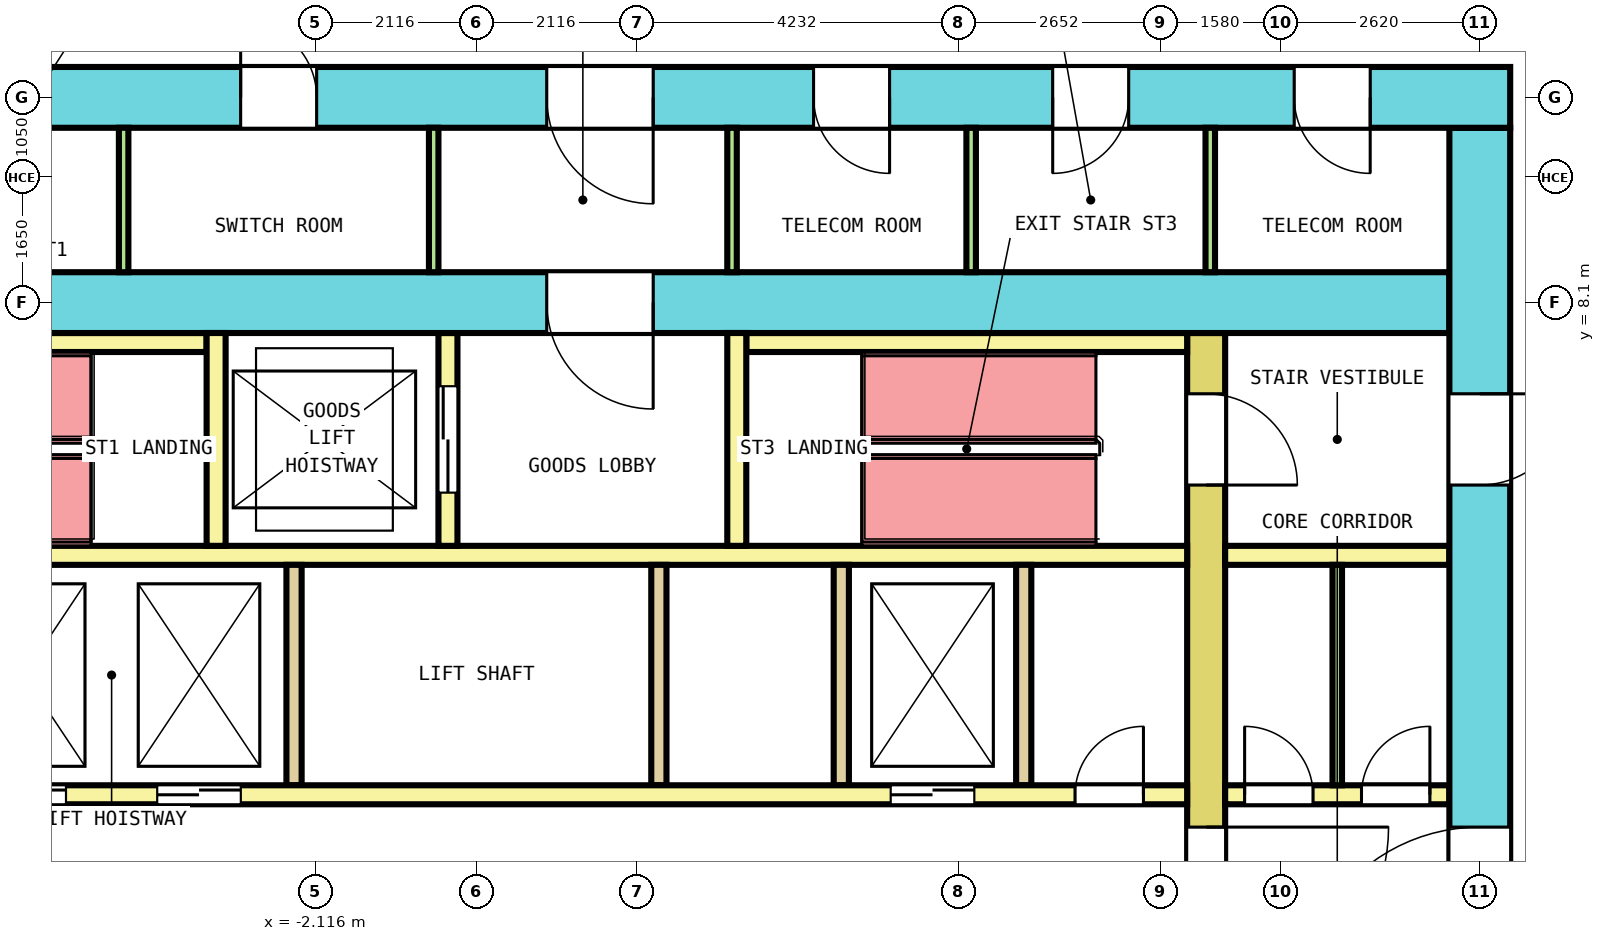
"""IFC4 building model, lengths in metres.
Left out: names, types, materials, properties, quantities, classifications, styles, units other than length and angle.
Written with IfcOpenShell. Run it as: python <this file> out.ifc"""

import sys

from ifc_helpers import new_model, si_unit, direction, frame, frame_2d, origin, place, context, subcontext, project, spatial, rectangle, extrude, element, fill, save


model = new_model("IFC4")
c1 = context("Model", 3, precision=1e-05, world=origin(), true_north=direction((0.0, 1.0)))
c2 = subcontext(c1, "Body", "Model", "MODEL_VIEW")
j1 = project(units=[si_unit("LENGTHUNIT", "METRE"), si_unit("PLANEANGLEUNIT", "RADIAN")], contexts=[c1])
p1 = place(None, origin())
s1 = spatial("IfcSite", under=j1, at=p1, CompositionType="ELEMENT")
p2 = place(p1, origin())
s2 = spatial("IfcBuilding", under=s1, at=p2, CompositionType="ELEMENT")
p3 = place(p2, frame((0.0, 0.0, 113.2)))
s3 = spatial("IfcBuildingStorey", under=s2, at=p3, CompositionType="ELEMENT", Elevation=113.2)
p4 = place(p3, frame((-13.6, 10.8, 0.0), z_axis=(0.0, 0.0, 1.0), x_axis=(1.0, 0.0, 0.0)))
e1 = element("IfcWall", 1, at=p4, inside=s3, PredefinedType="SHEAR", context=c2, shape_type="SweptSolid", body=[
    extrude(rectangle(XDim=27.2, YDim=0.8, at=frame_2d((13.6, 0.0))), origin(), (0.0, 0.0, 1.0), 4.1),
])
p5 = place(p4, frame((2.308, 0.0, 0.0)))
e2 = element("IfcOpeningElement", 2, at=p5, cuts=e1, PredefinedType="OPENING", context=c2, shape_type="SweptSolid", body=[
    extrude(rectangle(XDim=1.0, YDim=2.1, at=frame_2d((0.5, 1.05))), frame((0.0, 0.41, 0.0), z_axis=(0.0, -1.0, 0.0), x_axis=(1.0, 0.0, 0.0)), (0.0, 0.0, 1.0), 0.82),
])
p6 = place(p4, frame((6.419, 0.0, 0.0)))
e3 = element("IfcOpeningElement", 3, at=p6, cuts=e1, PredefinedType="OPENING", context=c2, shape_type="SweptSolid", body=[
    extrude(rectangle(XDim=1.0, YDim=2.1, at=frame_2d((0.5, 1.05))), frame((0.0, 0.41, 0.0), z_axis=(0.0, -1.0, 0.0), x_axis=(1.0, 0.0, 0.0)), (0.0, 0.0, 1.0), 0.82),
])
p7 = place(p4, frame((10.498, 0.0, 0.0)))
e4 = element("IfcOpeningElement", 4, at=p7, cuts=e1, PredefinedType="OPENING", context=c2, shape_type="SweptSolid", body=[
    extrude(rectangle(XDim=1.0, YDim=2.1, at=frame_2d((0.5, 1.05))), frame((0.0, 0.41, 0.0), z_axis=(0.0, -1.0, 0.0), x_axis=(1.0, 0.0, 0.0)), (0.0, 0.0, 1.0), 0.82),
])
p8 = place(p4, frame((18.035, 0.0, 0.0)))
e5 = element("IfcOpeningElement", 5, at=p8, cuts=e1, PredefinedType="OPENING", context=c2, shape_type="SweptSolid", body=[
    extrude(rectangle(XDim=1.0, YDim=2.1, at=frame_2d((0.5, 1.05))), frame((0.0, 0.41, 0.0), z_axis=(0.0, -1.0, 0.0), x_axis=(1.0, 0.0, 0.0)), (0.0, 0.0, 1.0), 0.82),
])
p9 = place(p4, frame((21.181, 0.0, 0.0)))
e6 = element("IfcOpeningElement", 6, at=p9, cuts=e1, PredefinedType="OPENING", context=c2, shape_type="SweptSolid", body=[
    extrude(rectangle(XDim=1.0, YDim=2.1, at=frame_2d((0.5, 1.05))), frame((0.0, 0.41, 0.0), z_axis=(0.0, -1.0, 0.0), x_axis=(1.0, 0.0, 0.0)), (0.0, 0.0, 1.0), 0.82),
])
p10 = place(p4, frame((24.358, 0.0, 0.0)))
e7 = element("IfcOpeningElement", 7, at=p10, cuts=e1, PredefinedType="OPENING", context=c2, shape_type="SweptSolid", body=[
    extrude(rectangle(XDim=1.0, YDim=2.1, at=frame_2d((0.5, 1.05))), frame((0.0, 0.41, 0.0), z_axis=(0.0, -1.0, 0.0), x_axis=(1.0, 0.0, 0.0)), (0.0, 0.0, 1.0), 0.82),
])
p11 = place(p4, frame((14.525, 0.0, 0.0)))
e8 = element("IfcOpeningElement", 8, at=p11, cuts=e1, PredefinedType="OPENING", context=c2, shape_type="SweptSolid", body=[
    extrude(rectangle(XDim=1.4, YDim=2.1, at=frame_2d((0.7, 1.05))), frame((0.0, 0.41, 0.0), z_axis=(0.0, -1.0, 0.0), x_axis=(1.0, 0.0, 0.0)), (0.0, 0.0, 1.0), 0.82),
])
p12 = place(p3, frame((13.2, -10.4, 0.0), z_axis=(0.0, 0.0, 1.0), x_axis=(0.0, 1.0, 0.0)))
e9 = element("IfcWall", 9, at=p12, inside=s3, PredefinedType="SHEAR", context=c2, shape_type="SweptSolid", body=[
    extrude(rectangle(XDim=20.8, YDim=0.8, at=frame_2d((10.4, 0.0))), origin(), (0.0, 0.0, 1.0), 4.1),
])
p13 = place(p12, frame((9.2, 0.0, 0.0)))
e10 = element("IfcOpeningElement", 10, at=p13, cuts=e9, PredefinedType="OPENING", context=c2, shape_type="SweptSolid", body=[
    extrude(rectangle(XDim=2.4, YDim=2.1, at=frame_2d((1.2, 1.05))), frame((0.0, 0.41, 0.0), z_axis=(0.0, -1.0, 0.0), x_axis=(1.0, 0.0, 0.0)), (0.0, 0.0, 1.0), 0.82),
])
p14 = place(p12, frame((16.1, 0.0, 0.0)))
e11 = element("IfcOpeningElement", 11, at=p14, cuts=e9, PredefinedType="OPENING", context=c2, shape_type="SweptSolid", body=[
    extrude(rectangle(XDim=1.2, YDim=2.1, at=frame_2d((0.6, 1.05))), frame((0.0, 0.41, 0.0), z_axis=(0.0, -1.0, 0.0), x_axis=(1.0, 0.0, 0.0)), (0.0, 0.0, 1.0), 0.82),
])
p15 = place(p12, frame((3.6, 0.0, 0.0)))
e12 = element("IfcOpeningElement", 12, at=p15, cuts=e9, PredefinedType="OPENING", context=c2, shape_type="SweptSolid", body=[
    extrude(rectangle(XDim=1.0, YDim=2.1, at=frame_2d((0.5, 1.05))), frame((0.0, 0.41, 0.0), z_axis=(0.0, -1.0, 0.0), x_axis=(1.0, 0.0, 0.0)), (0.0, 0.0, 1.0), 0.82),
])
p16 = place(p3, frame((-12.8, 8.1, 0.0), z_axis=(0.0, 0.0, 1.0), x_axis=(1.0, 0.0, 0.0)))
e13 = element("IfcWall", 13, at=p16, inside=s3, PredefinedType="SHEAR", context=c2, shape_type="SweptSolid", body=[
    extrude(rectangle(XDim=25.6, YDim=0.8, at=frame_2d((12.8, 0.0))), origin(), (0.0, 0.0, 1.0), 4.1),
])
p17 = place(p16, frame((13.725, 0.0, 0.0)))
e14 = element("IfcOpeningElement", 14, at=p17, cuts=e13, PredefinedType="OPENING", context=c2, shape_type="SweptSolid", body=[
    extrude(rectangle(XDim=1.4, YDim=2.1, at=frame_2d((0.7, 1.05))), frame((0.0, 0.41, 0.0), z_axis=(0.0, -1.0, 0.0), x_axis=(1.0, 0.0, 0.0)), (0.0, 0.0, 1.0), 0.82),
])
p18 = place(p3, frame((9.6, -7.7, 0.0), z_axis=(0.0, 0.0, 1.0), x_axis=(0.0, 1.0, 0.0)))
e15 = element("IfcWall", 15, at=p18, inside=s3, PredefinedType="SHEAR", context=c2, shape_type="SweptSolid", body=[
    extrude(rectangle(XDim=15.4, YDim=0.5, at=frame_2d((7.7, 0.0))), origin(), (0.0, 0.0, 1.0), 4.1),
])
p19 = place(p18, frame((6.5, 0.0, 0.0)))
e16 = element("IfcOpeningElement", 16, at=p19, cuts=e15, PredefinedType="OPENING", context=c2, shape_type="SweptSolid", body=[
    extrude(rectangle(XDim=2.4, YDim=2.1, at=frame_2d((1.2, 1.05))), frame((0.0, 0.26, 0.0), z_axis=(0.0, -1.0, 0.0), x_axis=(1.0, 0.0, 0.0)), (0.0, 0.0, 1.0), 0.52),
])
p20 = place(p18, frame((13.4, 0.0, 0.0)))
e17 = element("IfcOpeningElement", 17, at=p20, cuts=e15, PredefinedType="OPENING", context=c2, shape_type="SweptSolid", body=[
    extrude(rectangle(XDim=1.2, YDim=2.1, at=frame_2d((0.6, 1.05))), frame((0.0, 0.26, 0.0), z_axis=(0.0, -1.0, 0.0), x_axis=(1.0, 0.0, 0.0)), (0.0, 0.0, 1.0), 0.52),
])
p21 = place(p18, frame((0.9, 0.0, 0.0)))
e18 = element("IfcOpeningElement", 18, at=p21, cuts=e15, PredefinedType="OPENING", context=c2, shape_type="SweptSolid", body=[
    extrude(rectangle(XDim=1.0, YDim=2.1, at=frame_2d((0.5, 1.05))), frame((0.0, 0.26, 0.0), z_axis=(0.0, -1.0, 0.0), x_axis=(1.0, 0.0, 0.0)), (0.0, 0.0, 1.0), 0.52),
])
p22 = place(p3, frame((-9.35, 1.625, 0.0), z_axis=(0.0, 0.0, 1.0), x_axis=(1.0, 0.0, 0.0)))
e19 = element("IfcWall", 19, at=p22, inside=s3, PredefinedType="SOLIDWALL", context=c2, shape_type="SweptSolid", body=[
    extrude(rectangle(XDim=18.7, YDim=0.25, at=frame_2d((9.35, 0.0))), origin(), (0.0, 0.0, 1.0), 4.1),
])
p23 = place(p22, frame((2.85, 0.0, 0.0)))
e20 = element("IfcOpeningElement", 20, at=p23, cuts=e19, PredefinedType="OPENING", context=c2, shape_type="SweptSolid", body=[
    extrude(rectangle(XDim=1.1, YDim=2.1, at=frame_2d((0.55, 1.05))), frame((0.0, 0.135, 0.0), z_axis=(0.0, -1.0, 0.0), x_axis=(1.0, 0.0, 0.0)), (0.0, 0.0, 1.0), 0.27),
])
p24 = place(p22, frame((5.15, 0.0, 0.0)))
e21 = element("IfcOpeningElement", 21, at=p24, cuts=e19, PredefinedType="OPENING", context=c2, shape_type="SweptSolid", body=[
    extrude(rectangle(XDim=1.1, YDim=2.1, at=frame_2d((0.55, 1.05))), frame((0.0, 0.135, 0.0), z_axis=(0.0, -1.0, 0.0), x_axis=(1.0, 0.0, 0.0)), (0.0, 0.0, 1.0), 0.27),
])
p25 = place(p22, frame((14.8, 0.0, 0.0)))
e22 = element("IfcOpeningElement", 22, at=p25, cuts=e19, PredefinedType="OPENING", context=c2, shape_type="SweptSolid", body=[
    extrude(rectangle(XDim=1.1, YDim=2.1, at=frame_2d((0.55, 1.05))), frame((0.0, 0.135, 0.0), z_axis=(0.0, -1.0, 0.0), x_axis=(1.0, 0.0, 0.0)), (0.0, 0.0, 1.0), 0.27),
])
p26 = place(p22, frame((0.575, 0.0, 0.0)))
e23 = element("IfcOpeningElement", 23, at=p26, cuts=e19, PredefinedType="OPENING", context=c2, shape_type="SweptSolid", body=[
    extrude(rectangle(XDim=0.9, YDim=2.1, at=frame_2d((0.45, 1.05))), frame((0.0, 0.135, 0.0), z_axis=(0.0, -1.0, 0.0), x_axis=(1.0, 0.0, 0.0)), (0.0, 0.0, 1.0), 0.27),
])
p27 = place(p22, frame((17.225, 0.0, 0.0)))
e24 = element("IfcOpeningElement", 24, at=p27, cuts=e19, PredefinedType="OPENING", context=c2, shape_type="SweptSolid", body=[
    extrude(rectangle(XDim=0.9, YDim=2.1, at=frame_2d((0.45, 1.05))), frame((0.0, 0.135, 0.0), z_axis=(0.0, -1.0, 0.0), x_axis=(1.0, 0.0, 0.0)), (0.0, 0.0, 1.0), 0.27),
])
p28 = place(p3, frame((9.85, 1.625, 0.0), z_axis=(0.0, 0.0, 1.0), x_axis=(1.0, 0.0, 0.0)))
e25 = element("IfcWall", 25, at=p28, inside=s3, PredefinedType="SOLIDWALL", context=c2, shape_type="SweptSolid", body=[
    extrude(rectangle(XDim=2.95, YDim=0.25, at=frame_2d((1.475, 0.0))), origin(), (0.0, 0.0, 1.0), 4.1),
])
p29 = place(p28, frame((0.256, 0.0, 0.0)))
e26 = element("IfcOpeningElement", 26, at=p29, cuts=e25, PredefinedType="OPENING", context=c2, shape_type="SweptSolid", body=[
    extrude(rectangle(XDim=0.9, YDim=2.1, at=frame_2d((0.45, 1.05))), frame((0.0, 0.135, 0.0), z_axis=(0.0, -1.0, 0.0), x_axis=(1.0, 0.0, 0.0)), (0.0, 0.0, 1.0), 0.27),
])
p30 = place(p28, frame((1.794, 0.0, 0.0)))
e27 = element("IfcOpeningElement", 27, at=p30, cuts=e25, PredefinedType="OPENING", context=c2, shape_type="SweptSolid", body=[
    extrude(rectangle(XDim=0.9, YDim=2.1, at=frame_2d((0.45, 1.05))), frame((0.0, 0.135, 0.0), z_axis=(0.0, -1.0, 0.0), x_axis=(1.0, 0.0, 0.0)), (0.0, 0.0, 1.0), 0.27),
])
p31 = place(p3, frame((-9.35, 4.775, 0.0), z_axis=(0.0, 0.0, 1.0), x_axis=(1.0, 0.0, 0.0)))
e28 = element("IfcWall", 28, at=p31, inside=s3, PredefinedType="SOLIDWALL", context=c2, shape_type="SweptSolid", body=[
    extrude(rectangle(XDim=18.7, YDim=0.25, at=frame_2d((9.35, 0.0))), origin(), (0.0, 0.0, 1.0), 4.1),
])
p32 = place(p3, frame((9.85, 4.775, 0.0), z_axis=(0.0, 0.0, 1.0), x_axis=(1.0, 0.0, 0.0)))
e29 = element("IfcWall", 29, at=p32, inside=s3, PredefinedType="SOLIDWALL", context=c2, shape_type="SweptSolid", body=[
    extrude(rectangle(XDim=2.95, YDim=0.25, at=frame_2d((1.475, 0.0))), origin(), (0.0, 0.0, 1.0), 4.1),
])
for number, where, z_axis, x_axis in (
    (30, (-2.4, 1.75, 0.0), (0.0, 0.0, 1.0), (0.0, 1.0, 0.0)),
    (31, (2.4, 1.75, 0.0), (0.0, 0.0, 1.0), (0.0, 1.0, 0.0)),
    (32, (4.8, 1.75, 0.0), (0.0, 0.0, 1.0), (0.0, 1.0, 0.0)),
    (33, (7.2, 1.75, 0.0), (0.0, 0.0, 1.0), (0.0, 1.0, 0.0)),
):
    element("IfcWall", number, at=place(p3, frame(where, z_axis=z_axis, x_axis=x_axis)), inside=s3, PredefinedType="SOLIDWALL", context=c2, shape_type="SweptSolid", body=[
        extrude(rectangle(XDim=2.9, YDim=0.2, at=frame_2d((1.45, 0.0))), origin(), (0.0, 0.0, 1.0), 4.1),
    ])
for number, where, z_axis, x_axis in (
    (34, (-9.35, 7.575, 0.0), (0.0, 0.0, 1.0), (1.0, 0.0, 0.0)),
    (35, (3.55, 7.575, 0.0), (0.0, 0.0, 1.0), (1.0, 0.0, 0.0)),
):
    element("IfcWall", number, at=place(p3, frame(where, z_axis=z_axis, x_axis=x_axis)), inside=s3, PredefinedType="SOLIDWALL", context=c2, shape_type="SweptSolid", body=[
        extrude(rectangle(XDim=5.8, YDim=0.25, at=frame_2d((2.9, 0.0))), origin(), (0.0, 0.0, 1.0), 4.1),
    ])
p33 = place(p3, frame((-3.425, 4.9, 0.0), z_axis=(0.0, 0.0, 1.0), x_axis=(0.0, 1.0, 0.0)))
e36 = element("IfcWall", 36, at=p33, inside=s3, PredefinedType="SOLIDWALL", context=c2, shape_type="SweptSolid", body=[
    extrude(rectangle(XDim=2.8, YDim=0.25, at=frame_2d((1.4, 0.0))), origin(), (0.0, 0.0, 1.0), 4.1),
])
p34 = place(p3, frame((-0.375, 4.9, 0.0), z_axis=(0.0, 0.0, 1.0), x_axis=(0.0, 1.0, 0.0)))
e37 = element("IfcWall", 37, at=p34, inside=s3, PredefinedType="SOLIDWALL", context=c2, shape_type="SweptSolid", body=[
    extrude(rectangle(XDim=2.8, YDim=0.25, at=frame_2d((1.4, 0.0))), origin(), (0.0, 0.0, 1.0), 4.1),
])
p35 = place(p34, frame((0.7, 0.0, 0.0)))
e38 = element("IfcOpeningElement", 38, at=p35, cuts=e37, PredefinedType="OPENING", context=c2, shape_type="SweptSolid", body=[
    extrude(rectangle(XDim=1.4, YDim=2.1, at=frame_2d((0.7, 1.05))), frame((0.0, 0.135, 0.0), z_axis=(0.0, -1.0, 0.0), x_axis=(1.0, 0.0, 0.0)), (0.0, 0.0, 1.0), 0.27),
])
p36 = place(p3, frame((3.425, 4.9, 0.0), z_axis=(0.0, 0.0, 1.0), x_axis=(0.0, 1.0, 0.0)))
e39 = element("IfcWall", 39, at=p36, inside=s3, PredefinedType="SOLIDWALL", context=c2, shape_type="SweptSolid", body=[
    extrude(rectangle(XDim=2.8, YDim=0.25, at=frame_2d((1.4, 0.0))), origin(), (0.0, 0.0, 1.0), 4.1),
])
for number, where, z_axis, x_axis in (
    (40, (-4.642, 8.5, 0.0), (0.0, 0.0, 1.0), (0.0, 1.0, 0.0)),
    (41, (-0.562, 8.5, 0.0), (0.0, 0.0, 1.0), (0.0, 1.0, 0.0)),
    (42, (3.363, 8.5, 0.0), (0.0, 0.0, 1.0), (0.0, 1.0, 0.0)),
    (43, (6.508, 8.5, 0.0), (0.0, 0.0, 1.0), (0.0, 1.0, 0.0)),
    (44, (9.654, 8.5, 0.0), (0.0, 0.0, 1.0), (0.0, 1.0, 0.0)),
):
    element("IfcWall", number, at=place(p3, frame(where, z_axis=z_axis, x_axis=x_axis)), inside=s3, PredefinedType="PARTITIONING", context=c2, shape_type="SweptSolid", body=[
        extrude(rectangle(XDim=1.9, YDim=0.125, at=frame_2d((0.95, 0.0))), origin(), (0.0, 0.0, 1.0), 4.1),
    ])
p37 = place(p3, frame((11.325, 1.75, 0.0), z_axis=(0.0, 0.0, 1.0), x_axis=(0.0, 1.0, 0.0)))
e45 = element("IfcWall", 45, at=p37, inside=s3, PredefinedType="PARTITIONING", context=c2, shape_type="SweptSolid", body=[
    extrude(rectangle(XDim=2.9, YDim=0.125, at=frame_2d((1.45, 0.0))), origin(), (0.0, 0.0, 1.0), 4.1),
])
p38 = place(p23, origin())
e46 = element("IfcDoor", 46, at=p38, inside=s3, OperationType="DOUBLE_DOOR_SLIDING", PredefinedType="DOOR", context=c2, shape_type="SweptSolid", body=[
    extrude(rectangle(XDim=1.1, YDim=2.1, at=frame_2d((0.55, 1.05))), frame((0.0, 0.075, 0.0), z_axis=(0.0, -1.0, 0.0), x_axis=(1.0, 0.0, 0.0)), (0.0, 0.0, 1.0), 0.15),
])
fill(e20, e46)
p39 = place(p24, origin())
e47 = element("IfcDoor", 47, at=p39, inside=s3, OperationType="DOUBLE_DOOR_SLIDING", PredefinedType="DOOR", context=c2, shape_type="SweptSolid", body=[
    extrude(rectangle(XDim=1.1, YDim=2.1, at=frame_2d((0.55, 1.05))), frame((0.0, 0.075, 0.0), z_axis=(0.0, -1.0, 0.0), x_axis=(1.0, 0.0, 0.0)), (0.0, 0.0, 1.0), 0.15),
])
fill(e21, e47)
p40 = place(p25, origin())
e48 = element("IfcDoor", 48, at=p40, inside=s3, OperationType="DOUBLE_DOOR_SLIDING", PredefinedType="DOOR", context=c2, shape_type="SweptSolid", body=[
    extrude(rectangle(XDim=1.1, YDim=2.1, at=frame_2d((0.55, 1.05))), frame((0.0, 0.075, 0.0), z_axis=(0.0, -1.0, 0.0), x_axis=(1.0, 0.0, 0.0)), (0.0, 0.0, 1.0), 0.15),
])
fill(e22, e48)
p41 = place(p35, origin())
e49 = element("IfcDoor", 49, at=p41, inside=s3, OperationType="DOUBLE_DOOR_SLIDING", PredefinedType="DOOR", context=c2, shape_type="SweptSolid", body=[
    extrude(rectangle(XDim=1.4, YDim=2.1, at=frame_2d((0.7, 1.05))), frame((0.0, 0.075, 0.0), z_axis=(0.0, -1.0, 0.0), x_axis=(1.0, 0.0, 0.0)), (0.0, 0.0, 1.0), 0.15),
])
fill(e38, e49)
p42 = place(p19, origin())
e50 = element("IfcDoor", 50, at=p42, inside=s3, OperationType="DOUBLE_DOOR_SINGLE_SWING", PredefinedType="DOOR", context=c2, shape_type="SweptSolid", body=[
    extrude(rectangle(XDim=2.4, YDim=2.1, at=frame_2d((1.2, 1.05))), frame((0.0, 0.2, 0.0), z_axis=(0.0, -1.0, 0.0), x_axis=(1.0, 0.0, 0.0)), (0.0, 0.0, 1.0), 0.4),
])
fill(e16, e50)
p43 = place(p13, origin())
e51 = element("IfcDoor", 51, at=p43, inside=s3, OperationType="DOUBLE_DOOR_SINGLE_SWING", PredefinedType="DOOR", context=c2, shape_type="SweptSolid", body=[
    extrude(rectangle(XDim=2.4, YDim=2.1, at=frame_2d((1.2, 1.05))), frame((0.0, 0.3, 0.0), z_axis=(0.0, -1.0, 0.0), x_axis=(1.0, 0.0, 0.0)), (0.0, 0.0, 1.0), 0.6),
])
fill(e10, e51)
p44 = place(p20, origin())
e52 = element("IfcDoor", 52, at=p44, inside=s3, OperationType="SINGLE_SWING_RIGHT", PredefinedType="DOOR", context=c2, shape_type="SweptSolid", body=[
    extrude(rectangle(XDim=1.2, YDim=2.1, at=frame_2d((0.6, 1.05))), frame((0.0, 0.2, 0.0), z_axis=(0.0, -1.0, 0.0), x_axis=(1.0, 0.0, 0.0)), (0.0, 0.0, 1.0), 0.4),
])
fill(e17, e52)
p45 = place(p14, origin())
e53 = element("IfcDoor", 53, at=p45, inside=s3, OperationType="SINGLE_SWING_LEFT", PredefinedType="DOOR", context=c2, shape_type="SweptSolid", body=[
    extrude(rectangle(XDim=1.2, YDim=2.1, at=frame_2d((0.6, 1.05))), frame((0.0, 0.3, 0.0), z_axis=(0.0, -1.0, 0.0), x_axis=(1.0, 0.0, 0.0)), (0.0, 0.0, 1.0), 0.6),
])
fill(e11, e53)
p46 = place(p17, origin())
e54 = element("IfcDoor", 54, at=p46, inside=s3, OperationType="DOUBLE_DOOR_SINGLE_SWING", PredefinedType="DOOR", context=c2, shape_type="SweptSolid", body=[
    extrude(rectangle(XDim=1.4, YDim=2.1, at=frame_2d((0.7, 1.05))), frame((0.0, 0.3, 0.0), z_axis=(0.0, -1.0, 0.0), x_axis=(1.0, 0.0, 0.0)), (0.0, 0.0, 1.0), 0.6),
])
fill(e14, e54)
p47 = place(p7, origin())
e55 = element("IfcDoor", 55, at=p47, inside=s3, OperationType="SINGLE_SWING_RIGHT", PredefinedType="DOOR", context=c2, shape_type="SweptSolid", body=[
    extrude(rectangle(XDim=1.0, YDim=2.1, at=frame_2d((0.5, 1.05))), frame((0.0, 0.3, 0.0), z_axis=(0.0, -1.0, 0.0), x_axis=(1.0, 0.0, 0.0)), (0.0, 0.0, 1.0), 0.6),
])
fill(e4, e55)
p48 = place(p8, origin())
e56 = element("IfcDoor", 56, at=p48, inside=s3, OperationType="SINGLE_SWING_LEFT", PredefinedType="DOOR", context=c2, shape_type="SweptSolid", body=[
    extrude(rectangle(XDim=1.0, YDim=2.1, at=frame_2d((0.5, 1.05))), frame((0.0, 0.3, 0.0), z_axis=(0.0, -1.0, 0.0), x_axis=(1.0, 0.0, 0.0)), (0.0, 0.0, 1.0), 0.6),
])
fill(e5, e56)
p49 = place(p9, origin())
e57 = element("IfcDoor", 57, at=p49, inside=s3, OperationType="SINGLE_SWING_RIGHT", PredefinedType="DOOR", context=c2, shape_type="SweptSolid", body=[
    extrude(rectangle(XDim=1.0, YDim=2.1, at=frame_2d((0.5, 1.05))), frame((0.0, 0.3, 0.0), z_axis=(0.0, -1.0, 0.0), x_axis=(1.0, 0.0, 0.0)), (0.0, 0.0, 1.0), 0.6),
])
fill(e6, e57)
p50 = place(p10, origin())
e58 = element("IfcDoor", 58, at=p50, inside=s3, OperationType="SINGLE_SWING_LEFT", PredefinedType="DOOR", context=c2, shape_type="SweptSolid", body=[
    extrude(rectangle(XDim=1.0, YDim=2.1, at=frame_2d((0.5, 1.05))), frame((0.0, 0.3, 0.0), z_axis=(0.0, -1.0, 0.0), x_axis=(1.0, 0.0, 0.0)), (0.0, 0.0, 1.0), 0.6),
])
fill(e7, e58)
p51 = place(p11, origin())
e59 = element("IfcDoor", 59, at=p51, inside=s3, OperationType="DOUBLE_DOOR_SINGLE_SWING", PredefinedType="DOOR", context=c2, shape_type="SweptSolid", body=[
    extrude(rectangle(XDim=1.4, YDim=2.1, at=frame_2d((0.7, 1.05))), frame((0.0, 0.3, 0.0), z_axis=(0.0, -1.0, 0.0), x_axis=(1.0, 0.0, 0.0)), (0.0, 0.0, 1.0), 0.6),
])
fill(e8, e59)
p52 = place(p27, origin())
e60 = element("IfcDoor", 60, at=p52, inside=s3, OperationType="SINGLE_SWING_RIGHT", PredefinedType="DOOR", context=c2, shape_type="SweptSolid", body=[
    extrude(rectangle(XDim=0.9, YDim=2.1, at=frame_2d((0.45, 1.05))), frame((0.0, 0.075, 0.0), z_axis=(0.0, -1.0, 0.0), x_axis=(1.0, 0.0, 0.0)), (0.0, 0.0, 1.0), 0.15),
])
fill(e24, e60)
p53 = place(p29, origin())
e61 = element("IfcDoor", 61, at=p53, inside=s3, OperationType="SINGLE_SWING_LEFT", PredefinedType="DOOR", context=c2, shape_type="SweptSolid", body=[
    extrude(rectangle(XDim=0.9, YDim=2.1, at=frame_2d((0.45, 1.05))), frame((0.0, 0.075, 0.0), z_axis=(0.0, -1.0, 0.0), x_axis=(1.0, 0.0, 0.0)), (0.0, 0.0, 1.0), 0.15),
])
fill(e26, e61)
p54 = place(p30, origin())
e62 = element("IfcDoor", 62, at=p54, inside=s3, OperationType="SINGLE_SWING_RIGHT", PredefinedType="DOOR", context=c2, shape_type="SweptSolid", body=[
    extrude(rectangle(XDim=0.9, YDim=2.1, at=frame_2d((0.45, 1.05))), frame((0.0, 0.075, 0.0), z_axis=(0.0, -1.0, 0.0), x_axis=(1.0, 0.0, 0.0)), (0.0, 0.0, 1.0), 0.15),
])
fill(e27, e62)
save(model, sys.argv[1])
